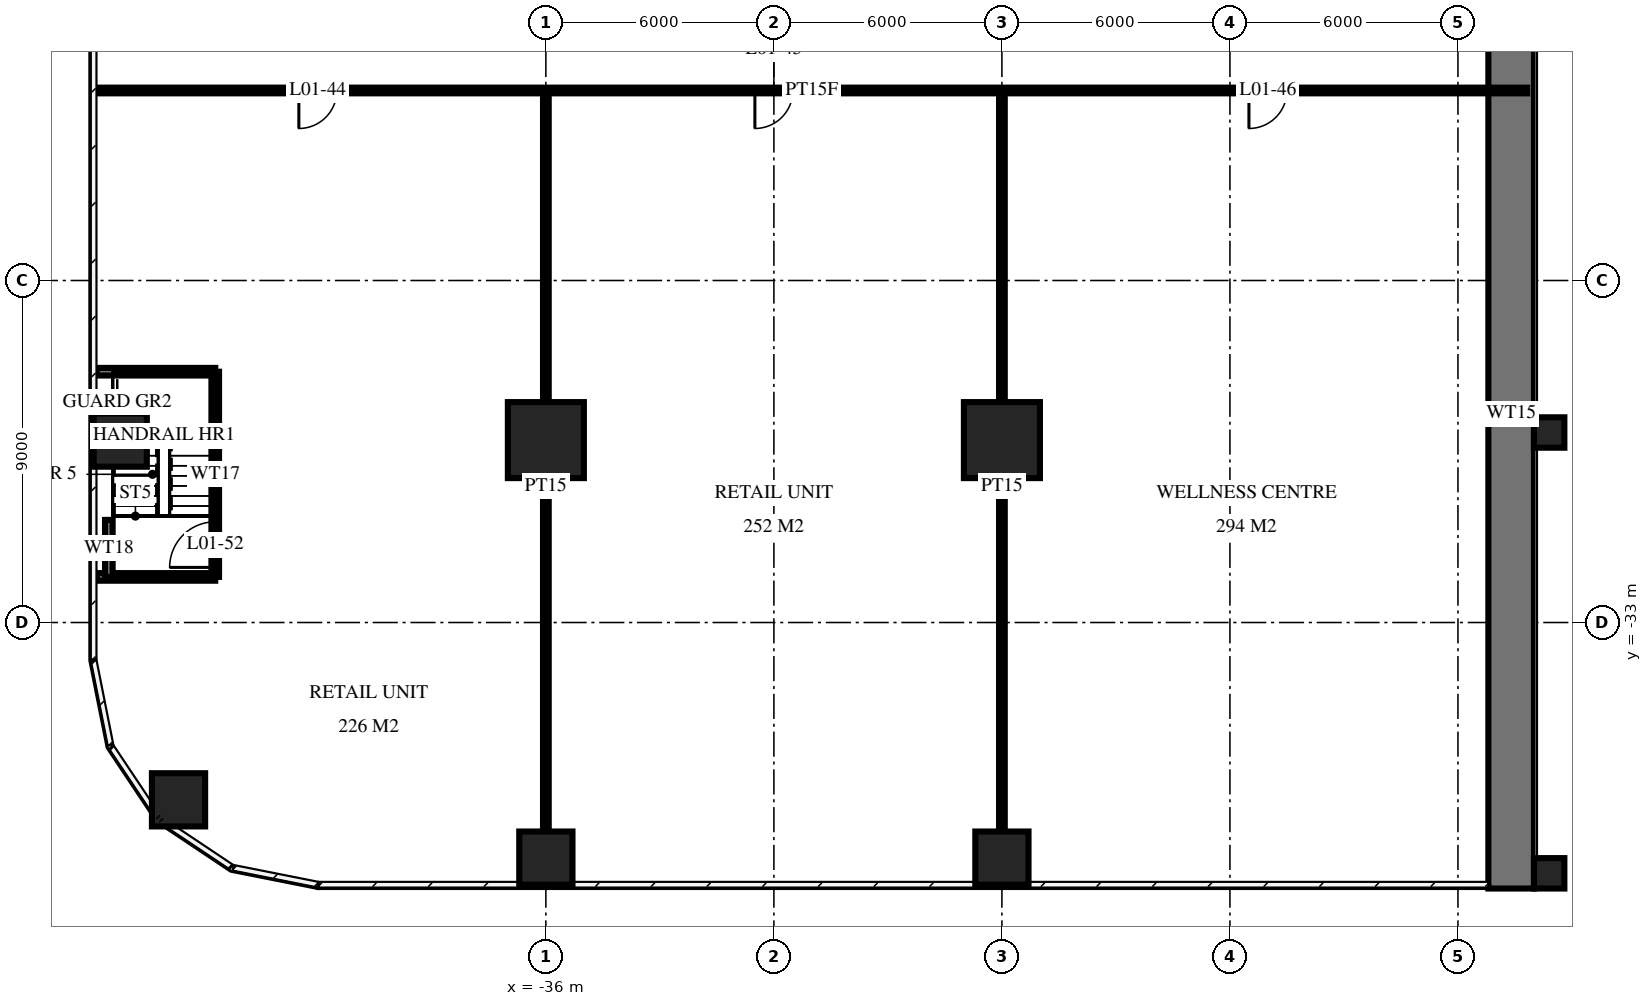
"""IFC4 building model, lengths in metres.
Left out: names, types, materials, properties, quantities, classifications, styles, units other than length and angle.
Written with IfcOpenShell. Run it as: python <this file> out.ifc"""

import sys

from ifc_helpers import new_model, si_unit, direction, frame, frame_2d, origin, origin_2d, place, context, subcontext, project, spatial, rectangle, circle, extrude, element, fill, save


model = new_model("IFC4")
c1 = context("Model", 3, precision=1e-05, world=origin(), true_north=direction((0.0, 1.0)))
c2 = subcontext(c1, "Body", "Model", "MODEL_VIEW")
j1 = project(units=[si_unit("LENGTHUNIT", "METRE"), si_unit("PLANEANGLEUNIT", "RADIAN")], contexts=[c1])
p1 = place(None, origin())
s1 = spatial("IfcSite", under=j1, at=p1, CompositionType="ELEMENT")
p2 = place(p1, origin())
s2 = spatial("IfcBuilding", under=s1, at=p2, CompositionType="ELEMENT")
p3 = place(p2, frame((0.0, 0.0, 7.0)))
s3 = spatial("IfcBuildingStorey", under=s2, at=p3, CompositionType="ELEMENT", Elevation=7.0)
for number, where, z_axis, x_axis in (
    (1, (-47.2, -28.2, 0.0), (0.0, 0.0, 1.0), (1.0, 0.0, 0.0)),
    (2, (-45.666, -37.666, 0.0), (0.0, 0.0, 1.0), (1.0, 0.0, 0.0)),
    (3, (-36.0, -39.2, 0.0), (0.0, 0.0, 1.0), (1.0, 0.0, 0.0)),
):
    element("IfcColumn", number, at=place(p3, frame(where, z_axis=z_axis, x_axis=x_axis)), inside=s3, PredefinedType="COLUMN", context=c2, shape_type="SweptSolid", body=[
        extrude(circle(Radius=0.7, at=origin_2d()), origin(), (0.0, 0.0, 1.0), 5.5),
    ])
p4 = place(p3, frame((-36.0, -28.2, 0.0), z_axis=(0.0, 0.0, 1.0), x_axis=(1.0, 0.0, 0.0)))
e4 = element("IfcColumn", 4, at=p4, inside=s3, PredefinedType="COLUMN", context=c2, shape_type="SweptSolid", body=[
    extrude(circle(Radius=1.0, at=origin_2d()), origin(), (0.0, 0.0, 1.0), 5.5),
])
p5 = place(p3, frame((-24.0, -39.2, 0.0), z_axis=(0.0, 0.0, 1.0), x_axis=(1.0, 0.0, 0.0)))
e5 = element("IfcColumn", 5, at=p5, inside=s3, PredefinedType="COLUMN", context=c2, shape_type="SweptSolid", body=[
    extrude(circle(Radius=0.7, at=origin_2d()), origin(), (0.0, 0.0, 1.0), 5.5),
])
p6 = place(p3, frame((-24.0, -28.2, 0.0), z_axis=(0.0, 0.0, 1.0), x_axis=(1.0, 0.0, 0.0)))
e6 = element("IfcColumn", 6, at=p6, inside=s3, PredefinedType="COLUMN", context=c2, shape_type="SweptSolid", body=[
    extrude(circle(Radius=1.0, at=origin_2d()), origin(), (0.0, 0.0, 1.0), 5.5),
])
p7 = place(p3, frame((-10.6, -40.0, 0.0), z_axis=(0.0, 0.0, 1.0), x_axis=(0.0, 1.0, 0.0)))
e7 = element("IfcWall", 7, at=p7, inside=s3, PredefinedType="SHEAR", context=c2, shape_type="SweptSolid", body=[
    extrude(rectangle(XDim=25.0, YDim=1.2, at=frame_2d((12.5, 0.0))), origin(), (0.0, 0.0, 1.0), 5.5),
])
for number, where, z_axis, x_axis in (
    (8, (-9.6, -39.6, 0.0), (0.0, 0.0, 1.0), (1.0, 0.0, 0.0)),
    (9, (-9.6, -28.0, 0.0), (0.0, 0.0, 1.0), (1.0, 0.0, 0.0)),
):
    element("IfcColumn", number, at=place(p3, frame(where, z_axis=z_axis, x_axis=x_axis)), inside=s3, PredefinedType="COLUMN", context=c2, shape_type="SweptSolid", body=[
        extrude(rectangle(XDim=0.8, YDim=0.8, at=origin_2d()), origin(), (0.0, 0.0, 1.0), 5.5),
    ])
for number, where, z_axis, x_axis in (
    (10, (-24.0, -39.82, 0.0), (0.0, 0.0, 1.0), (0.0, 1.0, 0.0)),
    (11, (-36.0, -39.82, 0.0), (0.0, 0.0, 1.0), (0.0, 1.0, 0.0)),
):
    element("IfcWall", number, at=place(p3, frame(where, z_axis=z_axis, x_axis=x_axis)), inside=s3, PredefinedType="PARTITIONING", context=c2, shape_type="SweptSolid", body=[
        extrude(rectangle(XDim=20.82, YDim=0.15, at=frame_2d((10.41, 0.0))), origin(), (0.0, 0.0, 1.0), 5.05),
    ])
p8 = place(p3, frame((-44.7, -31.8, 0.0), z_axis=(0.0, 0.0, 1.0), x_axis=(0.0, 1.0, 0.0)))
e12 = element("IfcWall", 12, at=p8, inside=s3, PredefinedType="SHEAR", context=c2, shape_type="SweptSolid", body=[
    extrude(rectangle(XDim=5.4, YDim=0.2, at=frame_2d((2.7, 0.0))), origin(), (0.0, 0.0, 1.0), 5.05),
])
p9 = place(p8, frame((0.25, 0.0, 0.0)))
e13 = element("IfcOpeningElement", 13, at=p9, cuts=e12, PredefinedType="OPENING", context=c2, shape_type="SweptSolid", body=[
    extrude(rectangle(XDim=1.2, YDim=2.1, at=frame_2d((0.6, 1.05))), frame((0.0, 0.11, 0.0), z_axis=(0.0, -1.0, 0.0), x_axis=(1.0, 0.0, 0.0)), (0.0, 0.0, 1.0), 0.22),
])
for number, where, z_axis, x_axis in (
    (14, (-47.82, -31.8, 0.0), (0.0, 0.0, 1.0), (1.0, 0.0, 0.0)),
    (15, (-47.82, -26.4, 0.0), (0.0, 0.0, 1.0), (1.0, 0.0, 0.0)),
):
    element("IfcWall", number, at=place(p3, frame(where, z_axis=z_axis, x_axis=x_axis)), inside=s3, PredefinedType="SHEAR", context=c2, shape_type="SweptSolid", body=[
        extrude(rectangle(XDim=3.12, YDim=0.2, at=frame_2d((1.56, 0.0))), origin(), (0.0, 0.0, 1.0), 5.05),
    ])
p10 = place(p3, frame((-47.82, -19.0, 0.0), z_axis=(0.0, 0.0, 1.0), x_axis=(1.0, 0.0, 0.0)))
e16 = element("IfcWall", 16, at=p10, inside=s3, PredefinedType="PARTITIONING", context=c2, shape_type="SweptSolid", body=[
    extrude(rectangle(XDim=37.64, YDim=0.15, at=frame_2d((18.82, 0.0))), origin(), (0.0, 0.0, 1.0), 5.05),
])
p11 = place(p10, frame((5.32, 0.0, 0.0)))
e17 = element("IfcOpeningElement", 17, at=p11, cuts=e16, PredefinedType="OPENING", context=c2, shape_type="SweptSolid", body=[
    extrude(rectangle(XDim=1.0, YDim=2.1, at=frame_2d((0.5, 1.05))), frame((0.0, 0.085, 0.0), z_axis=(0.0, -1.0, 0.0), x_axis=(1.0, 0.0, 0.0)), (0.0, 0.0, 1.0), 0.17),
])
p12 = place(p10, frame((17.32, 0.0, 0.0)))
e18 = element("IfcOpeningElement", 18, at=p12, cuts=e16, PredefinedType="OPENING", context=c2, shape_type="SweptSolid", body=[
    extrude(rectangle(XDim=1.0, YDim=2.1, at=frame_2d((0.5, 1.05))), frame((0.0, 0.085, 0.0), z_axis=(0.0, -1.0, 0.0), x_axis=(1.0, 0.0, 0.0)), (0.0, 0.0, 1.0), 0.17),
])
p13 = place(p10, frame((30.32, 0.0, 0.0)))
e19 = element("IfcOpeningElement", 19, at=p13, cuts=e16, PredefinedType="OPENING", context=c2, shape_type="SweptSolid", body=[
    extrude(rectangle(XDim=1.0, YDim=2.1, at=frame_2d((0.5, 1.05))), frame((0.0, 0.085, 0.0), z_axis=(0.0, -1.0, 0.0), x_axis=(1.0, 0.0, 0.0)), (0.0, 0.0, 1.0), 0.17),
])
p14 = place(p3, frame((-47.5, -31.8, 0.0), z_axis=(0.0, 0.0, 1.0), x_axis=(0.0, 1.0, 0.0)))
e20 = element("IfcWall", 20, at=p14, inside=s3, PredefinedType="SHEAR", context=c2, shape_type="SweptSolid", body=[
    extrude(rectangle(XDim=1.5, YDim=0.2, at=frame_2d((0.75, 0.0))), origin(), (0.0, 0.0, 1.0), 5.05),
])
p15 = place(p11, frame((0.5, 0.0, 0.0), z_axis=(0.0, 0.0, 1.0), x_axis=(-1.0, 0.0, 0.0)))
e21 = element("IfcDoor", 21, at=p15, inside=s3, OperationType="SINGLE_SWING_LEFT", PredefinedType="DOOR", context=c2, shape_type="SweptSolid", body=[
    extrude(rectangle(XDim=1.0, YDim=2.1, at=frame_2d((0.0, 1.05))), frame((0.0, -0.025, 0.0), z_axis=(0.0, 1.0, 0.0), x_axis=(-1.0, 0.0, 0.0)), (0.0, 0.0, 1.0), 0.05),
])
fill(e17, e21)
p16 = place(p12, frame((0.5, 0.0, 0.0), z_axis=(0.0, 0.0, 1.0), x_axis=(-1.0, 0.0, 0.0)))
e22 = element("IfcDoor", 22, at=p16, inside=s3, OperationType="SINGLE_SWING_LEFT", PredefinedType="DOOR", context=c2, shape_type="SweptSolid", body=[
    extrude(rectangle(XDim=1.0, YDim=2.1, at=frame_2d((0.0, 1.05))), frame((0.0, -0.025, 0.0), z_axis=(0.0, 1.0, 0.0), x_axis=(-1.0, 0.0, 0.0)), (0.0, 0.0, 1.0), 0.05),
])
fill(e18, e22)
p17 = place(p13, frame((0.5, 0.0, 0.0), z_axis=(0.0, 0.0, 1.0), x_axis=(-1.0, 0.0, 0.0)))
e23 = element("IfcDoor", 23, at=p17, inside=s3, OperationType="SINGLE_SWING_LEFT", PredefinedType="DOOR", context=c2, shape_type="SweptSolid", body=[
    extrude(rectangle(XDim=1.0, YDim=2.1, at=frame_2d((0.0, 1.05))), frame((0.0, -0.025, 0.0), z_axis=(0.0, 1.0, 0.0), x_axis=(-1.0, 0.0, 0.0)), (0.0, 0.0, 1.0), 0.05),
])
fill(e19, e23)
p18 = place(p9, origin())
e24 = element("IfcDoor", 24, at=p18, inside=s3, OperationType="SINGLE_SWING_RIGHT", PredefinedType="DOOR", context=c2, shape_type="SweptSolid", body=[
    extrude(rectangle(XDim=1.2, YDim=2.1, at=frame_2d((0.6, 1.05))), frame((0.0, 0.025, 0.0), z_axis=(0.0, -1.0, 0.0), x_axis=(1.0, 0.0, 0.0)), (0.0, 0.0, 1.0), 0.05),
])
fill(e13, e24)
save(model, sys.argv[1])
